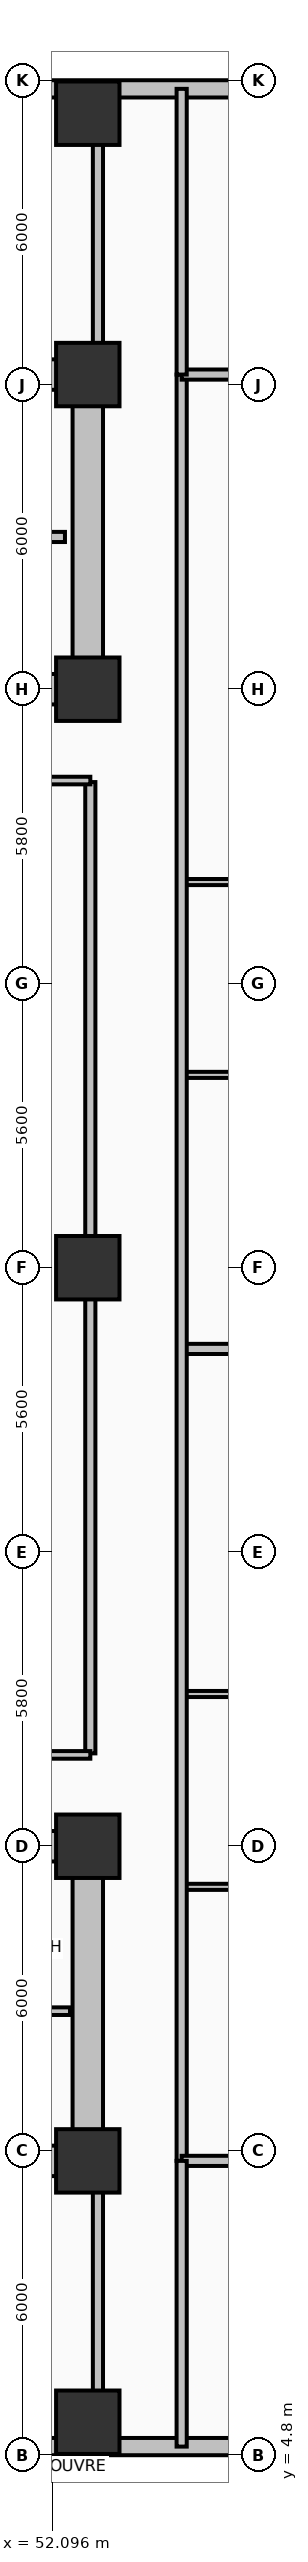
"""IFC4 building model, lengths in metres.
Left out: names, types, materials, properties, quantities, classifications, styles, units other than length and angle.
Written with IfcOpenShell. Run it as: python <this file> out.ifc"""

import sys

from ifc_helpers import new_model, si_unit, direction, frame, frame_2d, origin, origin_2d, place, context, subcontext, project, spatial, rectangle, extrude, element, fill, save


model = new_model("IFC4")
c1 = context("Model", 3, precision=1e-05, world=origin(), true_north=direction((0.0, 1.0)))
c2 = subcontext(c1, "Body", "Model", "MODEL_VIEW")
j1 = project(units=[si_unit("LENGTHUNIT", "METRE"), si_unit("PLANEANGLEUNIT", "RADIAN")], contexts=[c1])
p1 = place(None, origin())
s1 = spatial("IfcSite", under=j1, at=p1, CompositionType="ELEMENT")
p2 = place(p1, origin())
s2 = spatial("IfcBuilding", under=s1, at=p2, CompositionType="ELEMENT")
p3 = place(p2, frame((0.0, 0.0, 36.2)))
s3 = spatial("IfcBuildingStorey", under=s2, at=p3, CompositionType="ELEMENT", Elevation=36.2)
p4 = place(p3, frame((52.8, 10.6, 0.0), z_axis=(0.0, 0.0, 1.0), x_axis=(-1.0, 0.0, 0.0)))
e1 = element("IfcWall", 1, at=p4, inside=s3, PredefinedType="SHEAR", context=c2, shape_type="SweptSolid", body=[
    extrude(rectangle(XDim=27.2, YDim=0.6, at=frame_2d((13.6, 0.0))), origin(), (0.0, 0.0, 1.0), 3.7),
])
p5 = place(p3, frame((52.8, 10.9, 0.0), z_axis=(0.0, 0.0, 1.0), x_axis=(0.0, 1.0, 0.0)))
e2 = element("IfcWall", 2, at=p5, inside=s3, PredefinedType="SHEAR", context=c2, shape_type="SweptSolid", body=[
    extrude(rectangle(XDim=5.6, YDim=0.6, at=frame_2d((2.8, 0.0))), origin(), (0.0, 0.0, 1.0), 3.7),
])
p6 = place(p3, frame((25.6, 16.8, 0.0), z_axis=(0.0, 0.0, 1.0), x_axis=(1.0, 0.0, 0.0)))
e3 = element("IfcWall", 3, at=p6, inside=s3, PredefinedType="SHEAR", context=c2, shape_type="SweptSolid", body=[
    extrude(rectangle(XDim=27.2, YDim=0.6, at=frame_2d((13.6, 0.0))), origin(), (0.0, 0.0, 1.0), 3.7),
])
p7 = place(p6, frame((1.7, 0.0, 0.0)))
e4 = element("IfcOpeningElement", 4, at=p7, cuts=e3, PredefinedType="OPENING", context=c2, shape_type="SweptSolid", body=[
    extrude(rectangle(XDim=1.1, YDim=2.15, at=frame_2d((0.55, 1.075))), frame((0.0, 0.31, 0.0), z_axis=(0.0, -1.0, 0.0), x_axis=(1.0, 0.0, 0.0)), (0.0, 0.0, 1.0), 0.62),
])
p8 = place(p6, frame((4.45, 0.0, 0.0)))
e5 = element("IfcOpeningElement", 5, at=p8, cuts=e3, PredefinedType="OPENING", context=c2, shape_type="SweptSolid", body=[
    extrude(rectangle(XDim=0.85, YDim=2.1, at=frame_2d((0.425, 1.05))), frame((0.0, 0.31, 0.0), z_axis=(0.0, -1.0, 0.0), x_axis=(1.0, 0.0, 0.0)), (0.0, 0.0, 1.0), 0.62),
])
p9 = place(p6, frame((6.5, 0.0, 0.0)))
e6 = element("IfcOpeningElement", 6, at=p9, cuts=e3, PredefinedType="OPENING", context=c2, shape_type="SweptSolid", body=[
    extrude(rectangle(XDim=0.85, YDim=2.1, at=frame_2d((0.425, 1.05))), frame((0.0, 0.31, 0.0), z_axis=(0.0, -1.0, 0.0), x_axis=(1.0, 0.0, 0.0)), (0.0, 0.0, 1.0), 0.62),
])
p10 = place(p6, frame((13.0, 0.0, 0.0)))
e7 = element("IfcOpeningElement", 7, at=p10, cuts=e3, PredefinedType="OPENING", context=c2, shape_type="SweptSolid", body=[
    extrude(rectangle(XDim=1.2, YDim=2.15, at=frame_2d((0.6, 1.075))), frame((0.0, 0.31, 0.0), z_axis=(0.0, -1.0, 0.0), x_axis=(1.0, 0.0, 0.0)), (0.0, 0.0, 1.0), 0.62),
])
p11 = place(p6, frame((20.4, 0.0, 0.0)))
e8 = element("IfcOpeningElement", 8, at=p11, cuts=e3, PredefinedType="OPENING", context=c2, shape_type="SweptSolid", body=[
    extrude(rectangle(XDim=1.3, YDim=2.2, at=frame_2d((0.65, 1.1))), frame((0.0, 0.31, 0.0), z_axis=(0.0, -1.0, 0.0), x_axis=(1.0, 0.0, 0.0)), (0.0, 0.0, 1.0), 0.62),
])
p12 = place(p6, frame((24.65, 0.0, 0.0)))
e9 = element("IfcOpeningElement", 9, at=p12, cuts=e3, PredefinedType="OPENING", context=c2, shape_type="SweptSolid", body=[
    extrude(rectangle(XDim=0.85, YDim=2.1, at=frame_2d((0.425, 1.05))), frame((0.0, 0.31, 0.0), z_axis=(0.0, -1.0, 0.0), x_axis=(1.0, 0.0, 0.0)), (0.0, 0.0, 1.0), 0.62),
])
p13 = place(p3, frame((25.6, 45.8, 0.0), z_axis=(0.0, 0.0, 1.0), x_axis=(1.0, 0.0, 0.0)))
e10 = element("IfcWall", 10, at=p13, inside=s3, PredefinedType="SHEAR", context=c2, shape_type="SweptSolid", body=[
    extrude(rectangle(XDim=27.2, YDim=0.6, at=frame_2d((13.6, 0.0))), origin(), (0.0, 0.0, 1.0), 3.7),
])
p14 = place(p3, frame((52.8, 39.9, 0.0), z_axis=(0.0, 0.0, 1.0), x_axis=(0.0, 1.0, 0.0)))
e11 = element("IfcWall", 11, at=p14, inside=s3, PredefinedType="SHEAR", context=c2, shape_type="SweptSolid", body=[
    extrude(rectangle(XDim=5.6, YDim=0.6, at=frame_2d((2.8, 0.0))), origin(), (0.0, 0.0, 1.0), 3.7),
])
p15 = place(p3, frame((52.8, 39.6, 0.0), z_axis=(0.0, 0.0, 1.0), x_axis=(-1.0, 0.0, 0.0)))
e12 = element("IfcWall", 12, at=p15, inside=s3, PredefinedType="SHEAR", context=c2, shape_type="SweptSolid", body=[
    extrude(rectangle(XDim=27.2, YDim=0.6, at=frame_2d((13.6, 0.0))), origin(), (0.0, 0.0, 1.0), 3.7),
])
p16 = place(p15, frame((24.3, 0.0, 0.0)))
e13 = element("IfcOpeningElement", 13, at=p16, cuts=e12, PredefinedType="OPENING", context=c2, shape_type="SweptSolid", body=[
    extrude(rectangle(XDim=1.1, YDim=2.15, at=frame_2d((0.55, 1.075))), frame((0.0, 0.31, 0.0), z_axis=(0.0, -1.0, 0.0), x_axis=(1.0, 0.0, 0.0)), (0.0, 0.0, 1.0), 0.62),
])
p17 = place(p15, frame((21.85, 0.0, 0.0)))
e14 = element("IfcOpeningElement", 14, at=p17, cuts=e12, PredefinedType="OPENING", context=c2, shape_type="SweptSolid", body=[
    extrude(rectangle(XDim=0.85, YDim=2.1, at=frame_2d((0.425, 1.05))), frame((0.0, 0.31, 0.0), z_axis=(0.0, -1.0, 0.0), x_axis=(1.0, 0.0, 0.0)), (0.0, 0.0, 1.0), 0.62),
])
p18 = place(p15, frame((19.85, 0.0, 0.0)))
e15 = element("IfcOpeningElement", 15, at=p18, cuts=e12, PredefinedType="OPENING", context=c2, shape_type="SweptSolid", body=[
    extrude(rectangle(XDim=0.85, YDim=2.1, at=frame_2d((0.425, 1.05))), frame((0.0, 0.31, 0.0), z_axis=(0.0, -1.0, 0.0), x_axis=(1.0, 0.0, 0.0)), (0.0, 0.0, 1.0), 0.62),
])
p19 = place(p15, frame((15.1, 0.0, 0.0)))
e16 = element("IfcOpeningElement", 16, at=p19, cuts=e12, PredefinedType="OPENING", context=c2, shape_type="SweptSolid", body=[
    extrude(rectangle(XDim=1.2, YDim=2.15, at=frame_2d((0.6, 1.075))), frame((0.0, 0.31, 0.0), z_axis=(0.0, -1.0, 0.0), x_axis=(1.0, 0.0, 0.0)), (0.0, 0.0, 1.0), 0.62),
])
p20 = place(p15, frame((12.6, 0.0, 0.0)))
e17 = element("IfcOpeningElement", 17, at=p20, cuts=e12, PredefinedType="OPENING", context=c2, shape_type="SweptSolid", body=[
    extrude(rectangle(XDim=0.85, YDim=2.1, at=frame_2d((0.425, 1.05))), frame((0.0, 0.31, 0.0), z_axis=(0.0, -1.0, 0.0), x_axis=(1.0, 0.0, 0.0)), (0.0, 0.0, 1.0), 0.62),
])
p21 = place(p15, frame((10.85, 0.0, 0.0)))
e18 = element("IfcOpeningElement", 18, at=p21, cuts=e12, PredefinedType="OPENING", context=c2, shape_type="SweptSolid", body=[
    extrude(rectangle(XDim=0.85, YDim=2.1, at=frame_2d((0.425, 1.05))), frame((0.0, 0.31, 0.0), z_axis=(0.0, -1.0, 0.0), x_axis=(1.0, 0.0, 0.0)), (0.0, 0.0, 1.0), 0.62),
])
p22 = place(p15, frame((6.85, 0.0, 0.0)))
e19 = element("IfcOpeningElement", 19, at=p22, cuts=e12, PredefinedType="OPENING", context=c2, shape_type="SweptSolid", body=[
    extrude(rectangle(XDim=0.85, YDim=2.1, at=frame_2d((0.425, 1.05))), frame((0.0, 0.31, 0.0), z_axis=(0.0, -1.0, 0.0), x_axis=(1.0, 0.0, 0.0)), (0.0, 0.0, 1.0), 0.62),
])
p23 = place(p15, frame((2.0, 0.0, 0.0)))
e20 = element("IfcOpeningElement", 20, at=p23, cuts=e12, PredefinedType="OPENING", context=c2, shape_type="SweptSolid", body=[
    extrude(rectangle(XDim=0.85, YDim=2.1, at=frame_2d((0.425, 1.05))), frame((0.0, 0.31, 0.0), z_axis=(0.0, -1.0, 0.0), x_axis=(1.0, 0.0, 0.0)), (0.0, 0.0, 1.0), 0.62),
])
for number, where, z_axis, x_axis in (
    (21, (52.8, 10.6, 0.0), (0.0, 0.0, 1.0), (1.0, 0.0, 0.0)),
    (22, (52.8, 16.8, 0.0), (0.0, 0.0, 1.0), (1.0, 0.0, 0.0)),
    (23, (52.8, 39.6, 0.0), (0.0, 0.0, 1.0), (1.0, 0.0, 0.0)),
    (24, (52.8, 45.8, 0.0), (0.0, 0.0, 1.0), (1.0, 0.0, 0.0)),
    (25, (52.8, 28.2, 0.0), (0.0, 0.0, 1.0), (1.0, 0.0, 0.0)),
    (26, (52.8, 5.45, 0.0), (0.0, 0.0, 1.0), (1.0, 0.0, 0.0)),
    (27, (52.8, 50.95, 0.0), (0.0, 0.0, 1.0), (1.0, 0.0, 0.0)),
):
    element("IfcColumn", number, at=place(p3, frame(where, z_axis=z_axis, x_axis=x_axis)), inside=s3, PredefinedType="COLUMN", context=c2, shape_type="SweptSolid", body=[
        extrude(rectangle(XDim=1.25, YDim=1.25, at=origin_2d()), origin(), (0.0, 0.0, 1.0), 3.7),
    ])
p24 = place(p3, frame((42.4, 4.97, 0.0), z_axis=(0.0, 0.0, 1.0), x_axis=(1.0, 0.0, 0.0)))
e28 = element("IfcWall", 28, at=p24, inside=s3, PredefinedType="SOLIDWALL", context=c2, shape_type="SweptSolid", body=[
    extrude(rectangle(XDim=17.4, YDim=0.34, at=frame_2d((8.7, 0.0))), origin(), (0.0, 0.0, 1.0), 2.7),
])
p25 = place(p24, frame((2.06, 0.0, 0.93)))
e29 = element("IfcOpeningElement", 29, at=p25, cuts=e28, PredefinedType="OPENING", context=c2, shape_type="SweptSolid", body=[
    extrude(rectangle(XDim=1.1, YDim=1.65, at=frame_2d((0.55, 0.825))), frame((0.0, 0.18, 0.0), z_axis=(0.0, -1.0, 0.0), x_axis=(1.0, 0.0, 0.0)), (0.0, 0.0, 1.0), 0.36),
])
p26 = place(p24, frame((5.28, 0.0, 0.93)))
e30 = element("IfcOpeningElement", 30, at=p26, cuts=e28, PredefinedType="OPENING", context=c2, shape_type="SweptSolid", body=[
    extrude(rectangle(XDim=1.1, YDim=1.65, at=frame_2d((0.55, 0.825))), frame((0.0, 0.18, 0.0), z_axis=(0.0, -1.0, 0.0), x_axis=(1.0, 0.0, 0.0)), (0.0, 0.0, 1.0), 0.36),
])
p27 = place(p24, frame((7.8, 0.0, 0.93)))
e31 = element("IfcOpeningElement", 31, at=p27, cuts=e28, PredefinedType="OPENING", context=c2, shape_type="SweptSolid", body=[
    extrude(rectangle(XDim=1.1, YDim=1.65, at=frame_2d((0.55, 0.825))), frame((0.0, 0.18, 0.0), z_axis=(0.0, -1.0, 0.0), x_axis=(1.0, 0.0, 0.0)), (0.0, 0.0, 1.0), 0.36),
])
p28 = place(p24, frame((14.59, 0.0, 0.93)))
e32 = element("IfcOpeningElement", 32, at=p28, cuts=e28, PredefinedType="OPENING", context=c2, shape_type="SweptSolid", body=[
    extrude(rectangle(XDim=1.1, YDim=1.65, at=frame_2d((0.55, 0.825))), frame((0.0, 0.18, 0.0), z_axis=(0.0, -1.0, 0.0), x_axis=(1.0, 0.0, 0.0)), (0.0, 0.0, 1.0), 0.36),
])
p29 = place(p3, frame((59.8, 51.43, 0.0), z_axis=(0.0, 0.0, 1.0), x_axis=(-1.0, 0.0, 0.0)))
e33 = element("IfcWall", 33, at=p29, inside=s3, PredefinedType="SOLIDWALL", context=c2, shape_type="SweptSolid", body=[
    extrude(rectangle(XDim=17.4, YDim=0.34, at=frame_2d((8.7, 0.0))), origin(), (0.0, 0.0, 1.0), 2.7),
])
p30 = place(p29, frame((1.863, 0.0, 0.68)))
e34 = element("IfcOpeningElement", 34, at=p30, cuts=e33, PredefinedType="OPENING", context=c2, shape_type="SweptSolid", body=[
    extrude(rectangle(XDim=1.6, YDim=1.9, at=frame_2d((0.8, 0.95))), frame((0.0, 0.18, 0.0), z_axis=(0.0, -1.0, 0.0), x_axis=(1.0, 0.0, 0.0)), (0.0, 0.0, 1.0), 0.36),
])
p31 = place(p29, frame((9.913, 0.0, 0.68)))
e35 = element("IfcOpeningElement", 35, at=p31, cuts=e33, PredefinedType="OPENING", context=c2, shape_type="SweptSolid", body=[
    extrude(rectangle(XDim=1.6, YDim=1.9, at=frame_2d((0.8, 0.95))), frame((0.0, 0.18, 0.0), z_axis=(0.0, -1.0, 0.0), x_axis=(1.0, 0.0, 0.0)), (0.0, 0.0, 1.0), 0.36),
])
p32 = place(p29, frame((13.587, 0.0, 0.68)))
e36 = element("IfcOpeningElement", 36, at=p32, cuts=e33, PredefinedType="OPENING", context=c2, shape_type="SweptSolid", body=[
    extrude(rectangle(XDim=1.6, YDim=1.9, at=frame_2d((0.8, 0.95))), frame((0.0, 0.18, 0.0), z_axis=(0.0, -1.0, 0.0), x_axis=(1.0, 0.0, 0.0)), (0.0, 0.0, 1.0), 0.36),
])
p33 = place(p3, frame((49.6, 13.55, 0.0), z_axis=(0.0, 0.0, 1.0), x_axis=(1.0, 0.0, 0.0)))
e37 = element("IfcWall", 37, at=p33, inside=s3, PredefinedType="PARTITIONING", context=c2, shape_type="SweptSolid", body=[
    extrude(rectangle(XDim=2.85, YDim=0.15, at=frame_2d((1.425, 0.0))), origin(), (0.0, 0.0, 1.0), 2.53),
])
p34 = place(p33, frame((0.9, 0.0, 0.0)))
e38 = element("IfcOpeningElement", 38, at=p34, cuts=e37, PredefinedType="OPENING", context=c2, shape_type="SweptSolid", body=[
    extrude(rectangle(XDim=0.85, YDim=2.1, at=frame_2d((0.425, 1.05))), frame((0.0, 0.085, 0.0), z_axis=(0.0, -1.0, 0.0), x_axis=(1.0, 0.0, 0.0)), (0.0, 0.0, 1.0), 0.17),
])
p35 = place(p3, frame((52.35, 42.6, 0.0), z_axis=(0.0, 0.0, 1.0), x_axis=(-1.0, 0.0, 0.0)))
e39 = element("IfcWall", 39, at=p35, inside=s3, PredefinedType="PARTITIONING", context=c2, shape_type="SweptSolid", body=[
    extrude(rectangle(XDim=8.8, YDim=0.2, at=frame_2d((4.4, 0.0))), origin(), (0.0, 0.0, 1.0), 2.53),
])
p36 = place(p3, frame((52.85, 18.63, 0.0), z_axis=(0.0, 0.0, 1.0), x_axis=(0.0, 1.0, 0.0)))
e40 = element("IfcWall", 40, at=p36, inside=s3, PredefinedType="PARTITIONING", context=c2, shape_type="SweptSolid", body=[
    extrude(rectangle(XDim=19.14, YDim=0.2, at=frame_2d((9.57, 0.0))), origin(), (0.0, 0.0, 1.0), 2.53),
])
for number, where, z_axis, x_axis in (
    (41, (42.75, 18.6, 0.0), (0.0, 0.0, 1.0), (1.0, 0.0, 0.0)),
    (42, (42.75, 37.8, 0.0), (0.0, 0.0, 1.0), (1.0, 0.0, 0.0)),
):
    element("IfcWall", number, at=place(p3, frame(where, z_axis=z_axis, x_axis=x_axis)), inside=s3, PredefinedType="PARTITIONING", context=c2, shape_type="SweptSolid", body=[
        extrude(rectangle(XDim=10.1, YDim=0.15, at=frame_2d((5.05, 0.0))), origin(), (0.0, 0.0, 1.0), 2.53),
    ])
p37 = place(p3, frame((54.65, 16.0, 0.0), z_axis=(0.0, 0.0, 1.0), x_axis=(1.0, 0.0, 0.0)))
e43 = element("IfcWall", 43, at=p37, inside=s3, PredefinedType="PARTITIONING", context=c2, shape_type="SweptSolid", body=[
    extrude(rectangle(XDim=2.25, YDim=0.12, at=frame_2d((1.125, 0.0))), origin(), (0.0, 0.0, 1.0), 2.53),
])
p38 = place(p37, frame((0.6, 0.0, 0.0)))
e44 = element("IfcOpeningElement", 44, at=p38, cuts=e43, PredefinedType="OPENING", context=c2, shape_type="SweptSolid", body=[
    extrude(rectangle(XDim=0.85, YDim=2.1, at=frame_2d((0.425, 1.05))), frame((0.0, 0.07, 0.0), z_axis=(0.0, -1.0, 0.0), x_axis=(1.0, 0.0, 0.0)), (0.0, 0.0, 1.0), 0.14),
])
p39 = place(p3, frame((54.65, 19.8, 0.0), z_axis=(0.0, 0.0, 1.0), x_axis=(1.0, 0.0, 0.0)))
e45 = element("IfcWall", 45, at=p39, inside=s3, PredefinedType="PARTITIONING", context=c2, shape_type="SweptSolid", body=[
    extrude(rectangle(XDim=2.25, YDim=0.12, at=frame_2d((1.125, 0.0))), origin(), (0.0, 0.0, 1.0), 2.53),
])
p40 = place(p3, frame((54.65, 26.6, 0.0), z_axis=(0.0, 0.0, 1.0), x_axis=(1.0, 0.0, 0.0)))
e46 = element("IfcWall", 46, at=p40, inside=s3, PredefinedType="PARTITIONING", context=c2, shape_type="SweptSolid", body=[
    extrude(rectangle(XDim=8.666, YDim=0.2, at=frame_2d((4.333, 0.0))), origin(), (0.0, 0.0, 1.0), 2.53),
])
p41 = place(p3, frame((54.65, 32.0, 0.0), z_axis=(0.0, 0.0, 1.0), x_axis=(1.0, 0.0, 0.0)))
e47 = element("IfcWall", 47, at=p41, inside=s3, PredefinedType="PARTITIONING", context=c2, shape_type="SweptSolid", body=[
    extrude(rectangle(XDim=2.25, YDim=0.12, at=frame_2d((1.125, 0.0))), origin(), (0.0, 0.0, 1.0), 2.53),
])
p42 = place(p41, frame((0.6, 0.0, 0.0)))
e48 = element("IfcOpeningElement", 48, at=p42, cuts=e47, PredefinedType="OPENING", context=c2, shape_type="SweptSolid", body=[
    extrude(rectangle(XDim=0.85, YDim=2.1, at=frame_2d((0.425, 1.05))), frame((0.0, 0.07, 0.0), z_axis=(0.0, -1.0, 0.0), x_axis=(1.0, 0.0, 0.0)), (0.0, 0.0, 1.0), 0.14),
])
p43 = place(p3, frame((54.65, 35.8, 0.0), z_axis=(0.0, 0.0, 1.0), x_axis=(1.0, 0.0, 0.0)))
e49 = element("IfcWall", 49, at=p43, inside=s3, PredefinedType="PARTITIONING", context=c2, shape_type="SweptSolid", body=[
    extrude(rectangle(XDim=2.25, YDim=0.12, at=frame_2d((1.125, 0.0))), origin(), (0.0, 0.0, 1.0), 2.53),
])
p44 = place(p3, frame((54.65, 10.6, 0.0), z_axis=(0.0, 0.0, 1.0), x_axis=(0.0, 1.0, 0.0)))
e50 = element("IfcWall", 50, at=p44, inside=s3, PredefinedType="PARTITIONING", context=c2, shape_type="SweptSolid", body=[
    extrude(rectangle(XDim=35.2, YDim=0.2, at=frame_2d((17.6, 0.0))), origin(), (0.0, 0.0, 1.0), 2.53),
])
p45 = place(p44, frame((2.65, 0.0, 0.0)))
e51 = element("IfcOpeningElement", 51, at=p45, cuts=e50, PredefinedType="OPENING", context=c2, shape_type="SweptSolid", body=[
    extrude(rectangle(XDim=1.0, YDim=2.15, at=frame_2d((0.5, 1.075))), frame((0.0, 0.11, 0.0), z_axis=(0.0, -1.0, 0.0), x_axis=(1.0, 0.0, 0.0)), (0.0, 0.0, 1.0), 0.22),
])
p46 = place(p44, frame((19.95, 0.0, 0.0)))
e52 = element("IfcOpeningElement", 52, at=p46, cuts=e50, PredefinedType="OPENING", context=c2, shape_type="SweptSolid", body=[
    extrude(rectangle(XDim=1.0, YDim=2.15, at=frame_2d((0.5, 1.075))), frame((0.0, 0.11, 0.0), z_axis=(0.0, -1.0, 0.0), x_axis=(1.0, 0.0, 0.0)), (0.0, 0.0, 1.0), 0.22),
])
for number, where, z_axis, x_axis in (
    (53, (54.65, 10.6, 0.0), (0.0, 0.0, 1.0), (1.0, 0.0, 0.0)),
    (54, (54.65, 45.8, 0.0), (0.0, 0.0, 1.0), (1.0, 0.0, 0.0)),
):
    element("IfcWall", number, at=place(p3, frame(where, z_axis=z_axis, x_axis=x_axis)), inside=s3, PredefinedType="PARTITIONING", context=c2, shape_type="SweptSolid", body=[
        extrude(rectangle(XDim=8.76, YDim=0.2, at=frame_2d((4.38, 0.0))), origin(), (0.0, 0.0, 1.0), 2.53),
    ])
p47 = place(p3, frame((54.65, 4.97, 0.0), z_axis=(0.0, 0.0, 1.0), x_axis=(0.0, 1.0, 0.0)))
e55 = element("IfcWall", 55, at=p47, inside=s3, PredefinedType="PARTITIONING", context=c2, shape_type="SweptSolid", body=[
    extrude(rectangle(XDim=5.63, YDim=0.2, at=frame_2d((2.815, 0.0))), origin(), (0.0, 0.0, 1.0), 2.53),
])
p48 = place(p3, frame((54.65, 45.8, 0.0), z_axis=(0.0, 0.0, 1.0), x_axis=(0.0, 1.0, 0.0)))
e56 = element("IfcWall", 56, at=p48, inside=s3, PredefinedType="PARTITIONING", context=c2, shape_type="SweptSolid", body=[
    extrude(rectangle(XDim=5.63, YDim=0.2, at=frame_2d((2.815, 0.0))), origin(), (0.0, 0.0, 1.0), 2.53),
])
p49 = place(p3, frame((53.0, 5.92, 0.0), z_axis=(0.0, 0.0, 1.0), x_axis=(0.0, 1.0, 0.0)))
e57 = element("IfcWall", 57, at=p49, inside=s3, PredefinedType="PARTITIONING", context=c2, shape_type="SweptSolid", body=[
    extrude(rectangle(XDim=4.38, YDim=0.2, at=frame_2d((2.19, 0.0))), origin(), (0.0, 0.0, 1.0), 2.53),
])
p50 = place(p49, frame((0.85, 0.0, 0.0)))
e58 = element("IfcOpeningElement", 58, at=p50, cuts=e57, PredefinedType="OPENING", context=c2, shape_type="SweptSolid", body=[
    extrude(rectangle(XDim=0.9, YDim=2.1, at=frame_2d((0.45, 1.05))), frame((0.0, 0.11, 0.0), z_axis=(0.0, -1.0, 0.0), x_axis=(1.0, 0.0, 0.0)), (0.0, 0.0, 1.0), 0.22),
])
p51 = place(p3, frame((53.0, 46.1, 0.0), z_axis=(0.0, 0.0, 1.0), x_axis=(0.0, 1.0, 0.0)))
e59 = element("IfcWall", 59, at=p51, inside=s3, PredefinedType="PARTITIONING", context=c2, shape_type="SweptSolid", body=[
    extrude(rectangle(XDim=4.38, YDim=0.2, at=frame_2d((2.19, 0.0))), origin(), (0.0, 0.0, 1.0), 2.53),
])
p52 = place(p51, frame((1.05, 0.0, 0.0)))
e60 = element("IfcOpeningElement", 60, at=p52, cuts=e59, PredefinedType="OPENING", context=c2, shape_type="SweptSolid", body=[
    extrude(rectangle(XDim=0.9, YDim=2.1, at=frame_2d((0.45, 1.05))), frame((0.0, 0.11, 0.0), z_axis=(0.0, -1.0, 0.0), x_axis=(1.0, 0.0, 0.0)), (0.0, 0.0, 1.0), 0.22),
])
p53 = place(p38, origin())
e61 = element("IfcDoor", 61, at=p53, inside=s3, OperationType="SINGLE_SWING_RIGHT", PredefinedType="DOOR", context=c2, shape_type="SweptSolid", body=[
    extrude(rectangle(XDim=0.85, YDim=2.1, at=frame_2d((0.425, 1.05))), frame((0.0, 0.025, 0.0), z_axis=(0.0, -1.0, 0.0), x_axis=(1.0, 0.0, 0.0)), (0.0, 0.0, 1.0), 0.05),
])
fill(e44, e61)
p54 = place(p42, origin())
e62 = element("IfcDoor", 62, at=p54, inside=s3, OperationType="SINGLE_SWING_LEFT", PredefinedType="DOOR", context=c2, shape_type="SweptSolid", body=[
    extrude(rectangle(XDim=0.85, YDim=2.1, at=frame_2d((0.425, 1.05))), frame((0.0, 0.025, 0.0), z_axis=(0.0, -1.0, 0.0), x_axis=(1.0, 0.0, 0.0)), (0.0, 0.0, 1.0), 0.05),
])
fill(e48, e62)
p55 = place(p45, origin())
e63 = element("IfcDoor", 63, at=p55, inside=s3, OperationType="SINGLE_SWING_RIGHT", PredefinedType="DOOR", context=c2, shape_type="SweptSolid", body=[
    extrude(rectangle(XDim=1.0, YDim=2.15, at=frame_2d((0.5, 1.075))), frame((0.0, 0.025, 0.0), z_axis=(0.0, -1.0, 0.0), x_axis=(1.0, 0.0, 0.0)), (0.0, 0.0, 1.0), 0.05),
])
fill(e51, e63)
p56 = place(p46, origin())
e64 = element("IfcDoor", 64, at=p56, inside=s3, OperationType="SINGLE_SWING_LEFT", PredefinedType="DOOR", context=c2, shape_type="SweptSolid", body=[
    extrude(rectangle(XDim=1.0, YDim=2.15, at=frame_2d((0.5, 1.075))), frame((0.0, 0.025, 0.0), z_axis=(0.0, -1.0, 0.0), x_axis=(1.0, 0.0, 0.0)), (0.0, 0.0, 1.0), 0.05),
])
fill(e52, e64)
p57 = place(p50, origin())
e65 = element("IfcDoor", 65, at=p57, inside=s3, OperationType="SINGLE_SWING_RIGHT", PredefinedType="DOOR", context=c2, shape_type="SweptSolid", body=[
    extrude(rectangle(XDim=0.9, YDim=2.1, at=frame_2d((0.45, 1.05))), frame((0.0, 0.025, 0.0), z_axis=(0.0, -1.0, 0.0), x_axis=(1.0, 0.0, 0.0)), (0.0, 0.0, 1.0), 0.05),
])
fill(e58, e65)
p58 = place(p52, origin())
e66 = element("IfcDoor", 66, at=p58, inside=s3, OperationType="SINGLE_SWING_LEFT", PredefinedType="DOOR", context=c2, shape_type="SweptSolid", body=[
    extrude(rectangle(XDim=0.9, YDim=2.1, at=frame_2d((0.45, 1.05))), frame((0.0, 0.025, 0.0), z_axis=(0.0, -1.0, 0.0), x_axis=(1.0, 0.0, 0.0)), (0.0, 0.0, 1.0), 0.05),
])
fill(e60, e66)
save(model, sys.argv[1])
